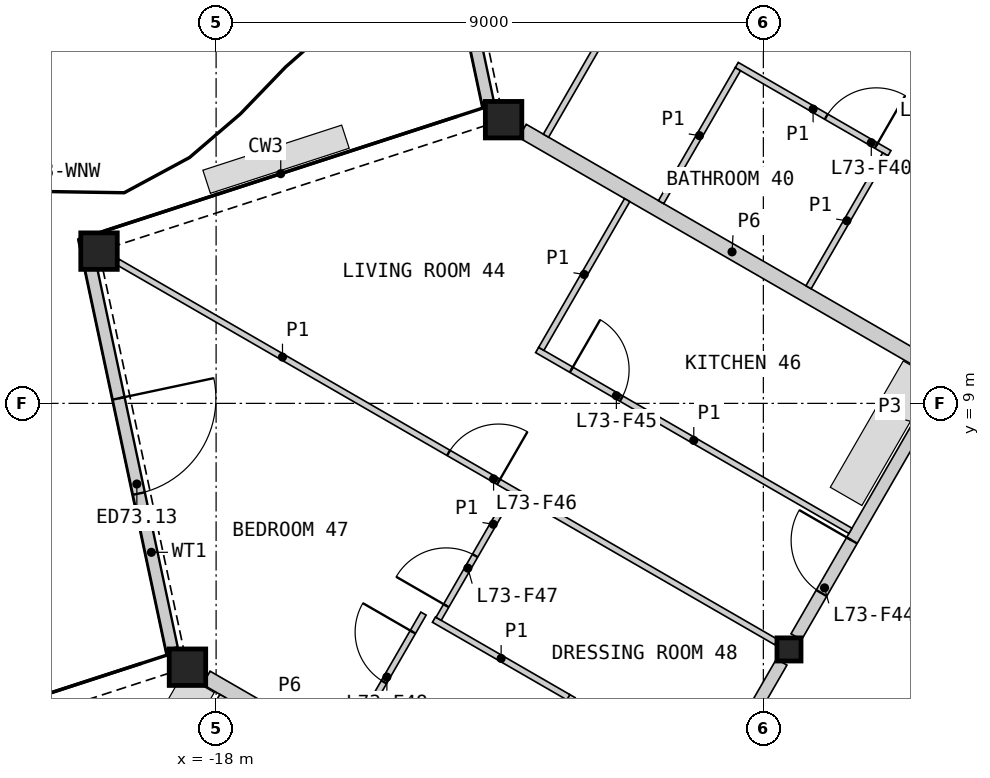
"""IFC4 building model, lengths in metres.
Left out: names, types, materials, properties, quantities, classifications, styles, units other than length and angle.
Written with IfcOpenShell. Run it as: python <this file> out.ifc"""

import sys

from ifc_helpers import new_model, si_unit, direction, frame, frame_2d, origin, origin_2d, place, context, subcontext, project, spatial, polyline, rectangle, hollow_rectangle, i_section, outline, extrude, element, fill, save


model = new_model("IFC4")
c1 = context("Model", 3, precision=1e-05, world=origin(), true_north=direction((0.0, 1.0)))
c2 = subcontext(c1, "Body", "Model", "MODEL_VIEW")
j1 = project(units=[si_unit("LENGTHUNIT", "METRE"), si_unit("PLANEANGLEUNIT", "RADIAN")], contexts=[c1])
p1 = place(None, origin())
s1 = spatial("IfcSite", under=j1, at=p1, CompositionType="ELEMENT")
p2 = place(p1, origin())
s2 = spatial("IfcBuilding", under=s1, at=p2, CompositionType="ELEMENT")
p3 = place(p2, frame((0.0, 0.0, 329.0)))
s3 = spatial("IfcBuildingStorey", under=s2, at=p3, CompositionType="ELEMENT", Elevation=329.0)
for number, where, z_axis, x_axis in (
    (1, (-13.272, 13.666, 0.0), (0.0, 0.0, 1.0), (1.0, 0.0, 0.0)),
    (2, (-19.926, 11.504, 0.0), (0.0, 0.0, 1.0), (1.0, 0.0, 0.0)),
    (3, (-18.471, 4.661, 0.0), (0.0, 0.0, 1.0), (1.0, 0.0, 0.0)),
):
    element("IfcColumn", number, at=place(p3, frame(where, z_axis=z_axis, x_axis=x_axis)), inside=s3, PredefinedType="COLUMN", context=c2, shape_type="SweptSolid", body=[
        extrude(hollow_rectangle(XDim=0.6, YDim=0.6, WallThickness=0.04, at=origin_2d()), origin(), (0.0, 0.0, 1.0), 3.4),
    ])
p4 = place(p3, frame((-8.578, 4.953, 0.0), z_axis=(0.0, 0.0, 1.0), x_axis=(1.0, 0.0, 0.0)))
e4 = element("IfcColumn", 4, at=p4, inside=s3, PredefinedType="COLUMN", context=c2, shape_type="SweptSolid", body=[
    extrude(i_section(OverallWidth=0.396, OverallDepth=0.381, WebThickness=0.019, FlangeThickness=0.03, at=origin_2d()), origin(), (0.0, 0.0, 1.0), 3.4),
])
p5 = place(p3, frame((-14.878, 20.292, 0.0), z_axis=(0.0, 0.0, 1.0), x_axis=(0.207943189785, -0.978140904892, 0.0)))
e5 = element("IfcWall", 5, at=p5, inside=s3, PredefinedType="SOLIDWALL", context=c2, shape_type="SweptSolid", body=[
    extrude(rectangle(XDim=6.467, YDim=0.2, at=frame_2d((3.233, 0.0))), origin(), (0.0, 0.0, 1.0), 2.488),
])
p6 = place(p5, frame((2.261, 0.0, 0.0)))
e6 = element("IfcOpeningElement", 6, at=p6, cuts=e5, PredefinedType="OPENING", context=c2, shape_type="SweptSolid", body=[
    extrude(rectangle(XDim=1.6, YDim=2.25, at=frame_2d((0.8, 1.125))), frame((0.0, 0.11, 0.0), z_axis=(0.0, -1.0, 0.0), x_axis=(1.0, 0.0, 0.0)), (0.0, 0.0, 1.0), 0.22),
])
p7 = place(p3, frame((-20.073, 11.294, 0.0), z_axis=(0.0, 0.0, 1.0), x_axis=(0.207893978909, -0.978151365349, 0.0)))
e7 = element("IfcWall", 7, at=p7, inside=s3, PredefinedType="SOLIDWALL", context=c2, shape_type="SweptSolid", body=[
    extrude(rectangle(XDim=6.466, YDim=0.2, at=frame_2d((3.233, 0.0))), origin(), (0.0, 0.0, 1.0), 2.488),
])
p8 = place(p7, frame((2.261, 0.0, 0.0)))
e8 = element("IfcOpeningElement", 8, at=p8, cuts=e7, PredefinedType="OPENING", context=c2, shape_type="SweptSolid", body=[
    extrude(rectangle(XDim=1.6, YDim=2.25, at=frame_2d((0.8, 1.125))), frame((0.0, 0.11, 0.0), z_axis=(0.0, -1.0, 0.0), x_axis=(1.0, 0.0, 0.0)), (0.0, 0.0, 1.0), 0.22),
])
p9 = place(p3, origin())
e9 = element("IfcWall", 9, at=p9, inside=s3, PredefinedType="SHEAR", context=c2, shape_type="SweptSolid", body=[
    extrude(outline(polyline([(-4.96, 0.208), (-7.131, 1.461), (-3.731, 7.35), (-1.561, 6.097), (-1.66, 5.924), (-3.652, 7.074), (-6.852, 1.531), (-4.861, 0.381), (-4.96, 0.208)])), origin(), (0.0, 0.0, 1.0), 3.1),
])
p10 = place(p3, frame((-3.794, 7.84, 0.0), z_axis=(0.0, 0.0, 1.0), x_axis=(-0.499974747889, -0.866039982607, 0.0)))
e10 = element("IfcWall", 10, at=p10, inside=s3, PredefinedType="SHEAR", context=c2, shape_type="SweptSolid", body=[
    extrude(rectangle(XDim=7.092, YDim=0.6, at=frame_2d((3.546, 0.0))), origin(), (0.0, 0.0, 1.0), 3.1),
])
p11 = place(p3, frame((-8.458, 5.16, 0.0), z_axis=(0.0, 0.0, 1.0), x_axis=(0.499984266882, 0.866034487114, 0.0)))
e11 = element("IfcWall", 11, at=p11, inside=s3, PredefinedType="PARTITIONING", context=c2, shape_type="SweptSolid", body=[
    extrude(rectangle(XDim=8.099, YDim=0.2, at=frame_2d((4.049, 0.0))), origin(), (0.0, 0.0, 1.0), 3.1),
])
p12 = place(p11, frame((5.935, 0.0, 0.0)))
e12 = element("IfcOpeningElement", 12, at=p12, cuts=e11, PredefinedType="OPENING", context=c2, shape_type="SweptSolid", body=[
    extrude(rectangle(XDim=1.0, YDim=2.1, at=frame_2d((0.5, 1.05))), frame((0.0, 0.11, 0.0), z_axis=(0.0, -1.0, 0.0), x_axis=(1.0, 0.0, 0.0)), (0.0, 0.0, 1.0), 0.22),
])
p13 = place(p11, frame((0.83, 0.0, 0.0)))
e13 = element("IfcOpeningElement", 13, at=p13, cuts=e11, PredefinedType="OPENING", context=c2, shape_type="SweptSolid", body=[
    extrude(rectangle(XDim=1.0, YDim=2.1, at=frame_2d((0.5, 1.05))), frame((0.0, 0.11, 0.0), z_axis=(0.0, -1.0, 0.0), x_axis=(1.0, 0.0, 0.0)), (0.0, 0.0, 1.0), 0.22),
])
p14 = place(p3, frame((-12.748, -2.269, 0.0), z_axis=(0.0, 0.0, 1.0), x_axis=(0.499984266882, 0.866034487114, 0.0)))
e14 = element("IfcWall", 14, at=p14, inside=s3, PredefinedType="PARTITIONING", context=c2, shape_type="SweptSolid", body=[
    extrude(rectangle(XDim=8.099, YDim=0.2, at=frame_2d((4.049, 0.0))), origin(), (0.0, 0.0, 1.0), 3.1),
])
p15 = place(p14, frame((1.164, 0.0, 0.0)))
e15 = element("IfcOpeningElement", 15, at=p15, cuts=e14, PredefinedType="OPENING", context=c2, shape_type="SweptSolid", body=[
    extrude(rectangle(XDim=1.0, YDim=2.1, at=frame_2d((0.5, 1.05))), frame((0.0, 0.11, 0.0), z_axis=(0.0, -1.0, 0.0), x_axis=(1.0, 0.0, 0.0)), (0.0, 0.0, 1.0), 0.22),
])
p16 = place(p3, frame((-12.962, 13.482, 0.0), z_axis=(0.0, 0.0, 1.0), x_axis=(0.866022671543, -0.50000473235, 0.0)))
e16 = element("IfcWall", 16, at=p16, inside=s3, PredefinedType="PARTITIONING", context=c2, shape_type="SweptSolid", body=[
    extrude(rectangle(XDim=7.961, YDim=0.25, at=frame_2d((3.98, 0.0))), origin(), (0.0, 0.0, 1.0), 2.33),
])
p17 = place(p3, frame((-18.161, 4.487, 0.0), z_axis=(0.0, 0.0, 1.0), x_axis=(0.866012646713, -0.500022095245, 0.0)))
e17 = element("IfcWall", 17, at=p17, inside=s3, PredefinedType="PARTITIONING", context=c2, shape_type="SweptSolid", body=[
    extrude(rectangle(XDim=2.516, YDim=0.25, at=frame_2d((1.258, 0.0))), origin(), (0.0, 0.0, 1.0), 2.33),
])
p18 = place(p3, frame((-14.417, 20.32, 0.0), z_axis=(0.0, 0.0, 1.0), x_axis=(0.866021216079, -0.500007253249, 0.0)))
e18 = element("IfcWall", 18, at=p18, inside=s3, PredefinedType="PARTITIONING", context=c2, shape_type="SweptSolid", body=[
    extrude(rectangle(XDim=12.639, YDim=0.1, at=frame_2d((6.32, 0.0))), origin(), (0.0, 0.0, 1.0), 2.33),
])
p19 = place(p18, frame((3.375, 0.0, 0.0)))
e19 = element("IfcOpeningElement", 19, at=p19, cuts=e18, PredefinedType="OPENING", context=c2, shape_type="SweptSolid", body=[
    extrude(rectangle(XDim=0.95, YDim=2.1, at=frame_2d((0.475, 1.05))), frame((0.0, 0.06, 0.0), z_axis=(0.0, -1.0, 0.0), x_axis=(1.0, 0.0, 0.0)), (0.0, 0.0, 1.0), 0.12),
])
p20 = place(p3, frame((-19.615, 11.325, 0.0), z_axis=(0.0, 0.0, 1.0), x_axis=(0.86602139559, -0.500006942333, 0.0)))
e20 = element("IfcWall", 20, at=p20, inside=s3, PredefinedType="PARTITIONING", context=c2, shape_type="SweptSolid", body=[
    extrude(rectangle(XDim=12.505, YDim=0.1, at=frame_2d((6.252, 0.0))), origin(), (0.0, 0.0, 1.0), 2.33),
])
p21 = place(p20, frame((6.28, 0.0, 0.0)))
e21 = element("IfcOpeningElement", 21, at=p21, cuts=e20, PredefinedType="OPENING", context=c2, shape_type="SweptSolid", body=[
    extrude(rectangle(XDim=0.95, YDim=2.1, at=frame_2d((0.475, 1.05))), frame((0.0, 0.06, 0.0), z_axis=(0.0, -1.0, 0.0), x_axis=(1.0, 0.0, 0.0)), (0.0, 0.0, 1.0), 0.12),
])
p22 = place(p3, frame((-12.721, 9.878, 0.0), z_axis=(0.0, 0.0, 1.0), x_axis=(0.866027751316, -0.499995933934, 0.0)))
e22 = element("IfcWall", 22, at=p22, inside=s3, PredefinedType="PARTITIONING", context=c2, shape_type="SweptSolid", body=[
    extrude(rectangle(XDim=5.95, YDim=0.1, at=frame_2d((2.975, 0.0))), origin(), (0.0, 0.0, 1.0), 2.33),
])
p23 = place(p22, frame((0.65, 0.0, 0.0)))
e23 = element("IfcOpeningElement", 23, at=p23, cuts=e22, PredefinedType="OPENING", context=c2, shape_type="SweptSolid", body=[
    extrude(rectangle(XDim=0.95, YDim=2.1, at=frame_2d((0.475, 1.05))), frame((0.0, 0.06, 0.0), z_axis=(0.0, -1.0, 0.0), x_axis=(1.0, 0.0, 0.0)), (0.0, 0.0, 1.0), 0.12),
])
p24 = place(p3, frame((-17.314, 0.823, 0.0), z_axis=(0.0, 0.0, 1.0), x_axis=(0.499988730927, 0.866031909889, 0.0)))
e24 = element("IfcWall", 24, at=p24, inside=s3, PredefinedType="PARTITIONING", context=c2, shape_type="SweptSolid", body=[
    extrude(rectangle(XDim=5.45, YDim=0.1, at=frame_2d((2.725, 0.0))), origin(), (0.0, 0.0, 1.0), 2.33),
])
p25 = place(p24, frame((4.15, 0.0, 0.0)))
e25 = element("IfcOpeningElement", 25, at=p25, cuts=e24, PredefinedType="OPENING", context=c2, shape_type="SweptSolid", body=[
    extrude(rectangle(XDim=0.95, YDim=2.1, at=frame_2d((0.475, 1.05))), frame((0.0, 0.06, 0.0), z_axis=(0.0, -1.0, 0.0), x_axis=(1.0, 0.0, 0.0)), (0.0, 0.0, 1.0), 0.12),
])
p26 = place(p3, frame((-14.889, -0.577, 0.0), z_axis=(0.0, 0.0, 1.0), x_axis=(0.500015767406, 0.866016300277, 0.0)))
e26 = element("IfcWall", 26, at=p26, inside=s3, PredefinedType="PARTITIONING", context=c2, shape_type="SweptSolid", body=[
    extrude(rectangle(XDim=5.5, YDim=0.1, at=frame_2d((2.75, 0.0))), origin(), (0.0, 0.0, 1.0), 2.33),
])
p27 = place(p3, frame((-12.575, 13.403, 0.0), z_axis=(0.0, 0.0, 1.0), x_axis=(0.499989096993, 0.866031698547, 0.0)))
e27 = element("IfcWall", 27, at=p27, inside=s3, PredefinedType="PARTITIONING", context=c2, shape_type="SweptSolid", body=[
    extrude(rectangle(XDim=5.02, YDim=0.1, at=frame_2d((2.51, 0.0))), origin(), (0.0, 0.0, 1.0), 2.33),
])
p28 = place(p27, frame((3.208, 0.0, 0.0)))
e28 = element("IfcOpeningElement", 28, at=p28, cuts=e27, PredefinedType="OPENING", context=c2, shape_type="SweptSolid", body=[
    extrude(rectangle(XDim=0.95, YDim=2.1, at=frame_2d((0.475, 1.05))), frame((0.0, 0.06, 0.0), z_axis=(0.0, -1.0, 0.0), x_axis=(1.0, 0.0, 0.0)), (0.0, 0.0, 1.0), 0.12),
])
p29 = place(p3, frame((-20.405, -0.158, 0.0), z_axis=(0.0, 0.0, 1.0), x_axis=(0.499989096993, 0.866031698547, 0.0)))
e29 = element("IfcWall", 29, at=p29, inside=s3, PredefinedType="PARTITIONING", context=c2, shape_type="SweptSolid", body=[
    extrude(rectangle(XDim=5.02, YDim=0.1, at=frame_2d((2.51, 0.0))), origin(), (0.0, 0.0, 1.0), 2.33),
])
p30 = place(p29, frame((0.862, 0.0, 0.0)))
e30 = element("IfcOpeningElement", 30, at=p30, cuts=e29, PredefinedType="OPENING", context=c2, shape_type="SweptSolid", body=[
    extrude(rectangle(XDim=0.95, YDim=2.1, at=frame_2d((0.475, 1.05))), frame((0.0, 0.06, 0.0), z_axis=(0.0, -1.0, 0.0), x_axis=(1.0, 0.0, 0.0)), (0.0, 0.0, 1.0), 0.12),
])
p31 = place(p3, frame((-12.652, 9.897, 0.0), z_axis=(0.0, 0.0, 1.0), x_axis=(0.500024172624, 0.866011447264, 0.0)))
e31 = element("IfcWall", 31, at=p31, inside=s3, PredefinedType="PARTITIONING", context=c2, shape_type="SweptSolid", body=[
    extrude(rectangle(XDim=2.825, YDim=0.1, at=frame_2d((1.413, 0.0))), origin(), (0.0, 0.0, 1.0), 2.33),
])
p32 = place(p3, frame((-9.438, 14.565, 0.0), z_axis=(0.0, 0.0, 1.0), x_axis=(0.866032775405, -0.499987231761, 0.0)))
e32 = element("IfcWall", 32, at=p32, inside=s3, PredefinedType="PARTITIONING", context=c2, shape_type="SweptSolid", body=[
    extrude(rectangle(XDim=2.9, YDim=0.1, at=frame_2d((1.45, 0.0))), origin(), (0.0, 0.0, 1.0), 2.33),
])
p33 = place(p32, frame((1.7, 0.0, 0.0)))
e33 = element("IfcOpeningElement", 33, at=p33, cuts=e32, PredefinedType="OPENING", context=c2, shape_type="SweptSolid", body=[
    extrude(rectangle(XDim=0.95, YDim=2.1, at=frame_2d((0.475, 1.05))), frame((0.0, 0.06, 0.0), z_axis=(0.0, -1.0, 0.0), x_axis=(1.0, 0.0, 0.0)), (0.0, 0.0, 1.0), 0.12),
])
for number, where, z_axis, x_axis in (
    (34, (-10.682, 12.31, 0.0), (0.0, 0.0, 1.0), (0.5, 0.866, 0.0)),
    (35, (-8.257, 10.91, 0.0), (0.0, 0.0, 1.0), (0.5, 0.866, 0.0)),
):
    element("IfcWall", number, at=place(p3, frame(where, z_axis=z_axis, x_axis=x_axis)), inside=s3, PredefinedType="PARTITIONING", context=c2, shape_type="SweptSolid", body=[
        extrude(rectangle(XDim=2.525, YDim=0.1, at=frame_2d((1.262, 0.0))), origin(), (0.0, 0.0, 1.0), 2.33),
    ])
p34 = place(p3, frame((-14.417, 5.443, 0.0), z_axis=(0.0, 0.0, 1.0), x_axis=(0.865991210529, -0.500059219779, 0.0)))
e36 = element("IfcWall", 36, at=p34, inside=s3, PredefinedType="PARTITIONING", context=c2, shape_type="SweptSolid", body=[
    extrude(rectangle(XDim=2.552, YDim=0.1, at=frame_2d((1.276, 0.0))), origin(), (0.0, 0.0, 1.0), 2.33),
])
p35 = place(p3, frame((-14.341, 5.457, 0.0), z_axis=(0.0, 0.0, 1.0), x_axis=(0.499954846121, 0.866051471819, 0.0)))
e37 = element("IfcWall", 37, at=p35, inside=s3, PredefinedType="PARTITIONING", context=c2, shape_type="SweptSolid", body=[
    extrude(rectangle(XDim=2.395, YDim=0.1, at=frame_2d((1.197, 0.0))), origin(), (0.0, 0.0, 1.0), 2.33),
])
p36 = place(p35, frame((0.25, 0.0, 0.0)))
e38 = element("IfcOpeningElement", 38, at=p36, cuts=e37, PredefinedType="OPENING", context=c2, shape_type="SweptSolid", body=[
    extrude(rectangle(XDim=0.95, YDim=2.1, at=frame_2d((0.475, 1.05))), frame((0.0, 0.06, 0.0), z_axis=(0.0, -1.0, 0.0), x_axis=(1.0, 0.0, 0.0)), (0.0, 0.0, 1.0), 0.12),
])
p37 = place(p8, origin())
e39 = element("IfcDoor", 39, at=p37, inside=s3, OperationType="DOUBLE_DOOR_SINGLE_SWING", PredefinedType="DOOR", context=c2, shape_type="SweptSolid", body=[
    extrude(rectangle(XDim=1.6, YDim=2.25, at=frame_2d((0.8, 1.125))), frame((0.0, 0.025, 0.0), z_axis=(0.0, -1.0, 0.0), x_axis=(1.0, 0.0, 0.0)), (0.0, 0.0, 1.0), 0.05),
])
fill(e8, e39)
p38 = place(p33, origin())
e40 = element("IfcDoor", 40, at=p38, inside=s3, OperationType="SINGLE_SWING_RIGHT", PredefinedType="DOOR", context=c2, shape_type="SweptSolid", body=[
    extrude(rectangle(XDim=0.95, YDim=2.1, at=frame_2d((0.475, 1.05))), frame((0.0, 0.025, 0.0), z_axis=(0.0, -1.0, 0.0), x_axis=(1.0, 0.0, 0.0)), (0.0, 0.0, 1.0), 0.05),
])
fill(e33, e40)
p39 = place(p13, origin())
e41 = element("IfcDoor", 41, at=p39, inside=s3, OperationType="SINGLE_SWING_RIGHT", PredefinedType="DOOR", context=c2, shape_type="SweptSolid", body=[
    extrude(rectangle(XDim=1.0, YDim=2.1, at=frame_2d((0.5, 1.05))), frame((0.0, 0.025, 0.0), z_axis=(0.0, -1.0, 0.0), x_axis=(1.0, 0.0, 0.0)), (0.0, 0.0, 1.0), 0.05),
])
fill(e13, e41)
p40 = place(p23, origin())
e42 = element("IfcDoor", 42, at=p40, inside=s3, OperationType="SINGLE_SWING_LEFT", PredefinedType="DOOR", context=c2, shape_type="SweptSolid", body=[
    extrude(rectangle(XDim=0.95, YDim=2.1, at=frame_2d((0.475, 1.05))), frame((0.0, 0.025, 0.0), z_axis=(0.0, -1.0, 0.0), x_axis=(1.0, 0.0, 0.0)), (0.0, 0.0, 1.0), 0.05),
])
fill(e23, e42)
p41 = place(p21, origin())
e43 = element("IfcDoor", 43, at=p41, inside=s3, OperationType="SINGLE_SWING_RIGHT", PredefinedType="DOOR", context=c2, shape_type="SweptSolid", body=[
    extrude(rectangle(XDim=0.95, YDim=2.1, at=frame_2d((0.475, 1.05))), frame((0.0, 0.025, 0.0), z_axis=(0.0, -1.0, 0.0), x_axis=(1.0, 0.0, 0.0)), (0.0, 0.0, 1.0), 0.05),
])
fill(e21, e43)
p42 = place(p36, origin())
e44 = element("IfcDoor", 44, at=p42, inside=s3, OperationType="SINGLE_SWING_LEFT", PredefinedType="DOOR", context=c2, shape_type="SweptSolid", body=[
    extrude(rectangle(XDim=0.95, YDim=2.1, at=frame_2d((0.475, 1.05))), frame((0.0, 0.025, 0.0), z_axis=(0.0, -1.0, 0.0), x_axis=(1.0, 0.0, 0.0)), (0.0, 0.0, 1.0), 0.05),
])
fill(e38, e44)
p43 = place(p25, origin())
e45 = element("IfcDoor", 45, at=p43, inside=s3, OperationType="SINGLE_SWING_RIGHT", PredefinedType="DOOR", context=c2, shape_type="SweptSolid", body=[
    extrude(rectangle(XDim=0.95, YDim=2.1, at=frame_2d((0.475, 1.05))), frame((0.0, 0.025, 0.0), z_axis=(0.0, -1.0, 0.0), x_axis=(1.0, 0.0, 0.0)), (0.0, 0.0, 1.0), 0.05),
])
fill(e25, e45)
save(model, sys.argv[1])
